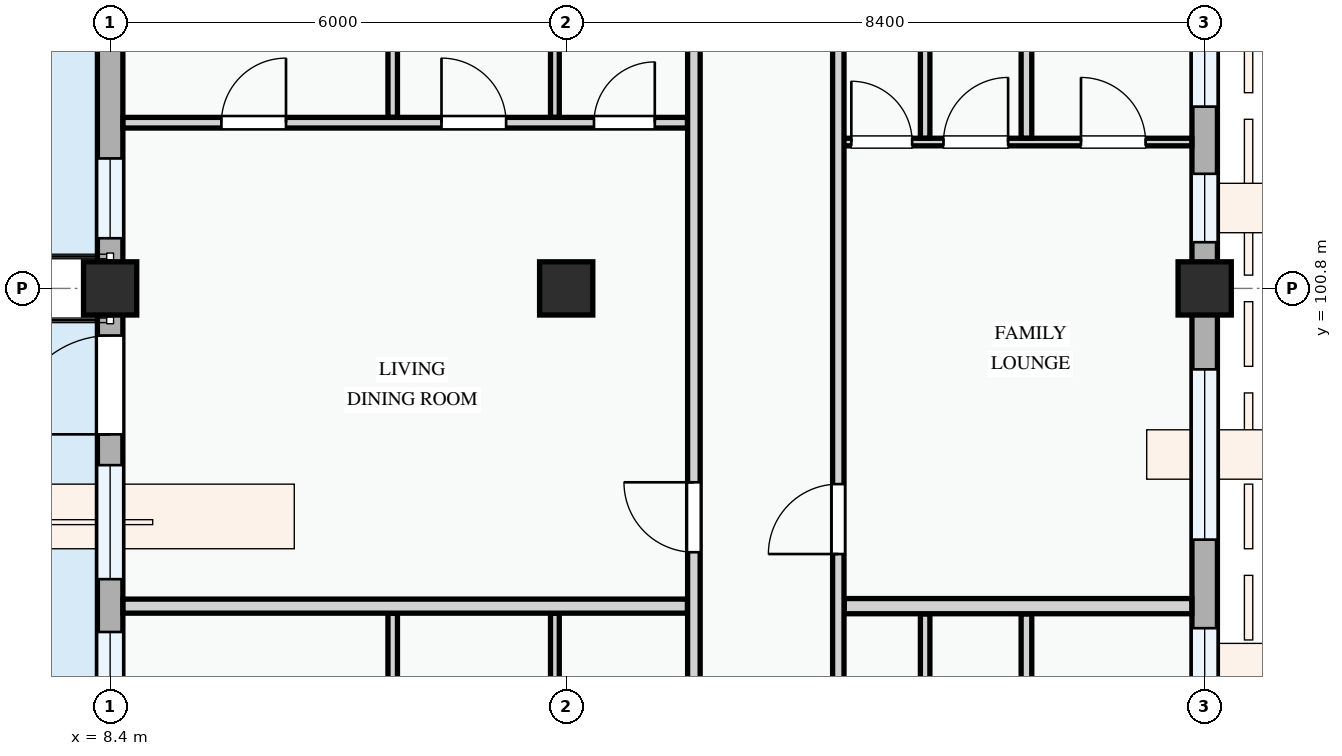
"""IFC4 building model, lengths in metres.
Left out: names, types, materials, properties, quantities, classifications, styles, units other than length and angle.
Written with IfcOpenShell. Run it as: python <this file> out.ifc"""

import sys

from ifc_helpers import new_model, si_unit, direction, frame, frame_2d, origin, origin_2d, place, context, subcontext, project, spatial, rectangle, extrude, element, fill, save


model = new_model("IFC4")
c1 = context("Model", 3, precision=1e-05, world=origin(), true_north=direction((0.0, 1.0)))
c2 = subcontext(c1, "Body", "Model", "MODEL_VIEW")
j1 = project(units=[si_unit("LENGTHUNIT", "METRE"), si_unit("PLANEANGLEUNIT", "RADIAN")], contexts=[c1])
p1 = place(None, origin())
s1 = spatial("IfcSite", under=j1, at=p1, CompositionType="ELEMENT")
p2 = place(p1, origin())
s2 = spatial("IfcBuilding", under=s1, at=p2, CompositionType="ELEMENT")
p3 = place(p2, frame((0.0, 0.0, 18.0)))
s3 = spatial("IfcBuildingStorey", under=s2, at=p3, CompositionType="ELEMENT", Elevation=18.0)
for number, where, z_axis, x_axis in (
    (1, (8.4, 100.8, 0.0), (0.0, 0.0, 1.0), (1.0, 0.0, 0.0)),
    (2, (14.4, 100.8, 0.0), (0.0, 0.0, 1.0), (1.0, 0.0, 0.0)),
    (3, (22.8, 100.8, 0.0), (0.0, 0.0, 1.0), (1.0, 0.0, 0.0)),
):
    element("IfcColumn", number, at=place(p3, frame(where, z_axis=z_axis, x_axis=x_axis)), inside=s3, PredefinedType="COLUMN", context=c2, shape_type="SweptSolid", body=[
        extrude(rectangle(XDim=0.7, YDim=0.7, at=origin_2d()), origin(), (0.0, 0.0, 1.0), 3.3),
    ])
p4 = place(p3, frame((8.4, 109.2, 0.0), z_axis=(0.0, 0.0, 1.0), x_axis=(0.0, -1.0, 0.0)))
e4 = element("IfcWall", 4, at=p4, inside=s3, PredefinedType="STANDARD", context=c2, shape_type="SweptSolid", body=[
    extrude(rectangle(XDim=8.4, YDim=0.335, at=frame_2d((4.2, 0.0))), origin(), (0.0, 0.0, 1.0), 2.425),
])
p5 = place(p4, frame((0.62, 0.0, 0.0)))
e5 = element("IfcOpeningElement", 5, at=p5, cuts=e4, PredefinedType="OPENING", context=c2, shape_type="SweptSolid", body=[
    extrude(rectangle(XDim=1.25, YDim=2.2, at=frame_2d((0.625, 1.1))), frame((0.0, 0.177, 0.0), z_axis=(0.0, -1.0, 0.0), x_axis=(1.0, 0.0, 0.0)), (0.0, 0.0, 1.0), 0.355),
])
p6 = place(p4, frame((3.16, 0.0, 0.78)))
e6 = element("IfcOpeningElement", 6, at=p6, cuts=e4, PredefinedType="OPENING", context=c2, shape_type="SweptSolid", body=[
    extrude(rectangle(XDim=1.82, YDim=1.46, at=frame_2d((0.91, 0.73))), frame((0.0, 0.177, 0.0), z_axis=(0.0, -1.0, 0.0), x_axis=(1.0, 0.0, 0.0)), (0.0, 0.0, 1.0), 0.355),
])
p7 = place(p4, frame((6.69, 0.0, 0.78)))
e7 = element("IfcOpeningElement", 7, at=p7, cuts=e4, PredefinedType="OPENING", context=c2, shape_type="SweptSolid", body=[
    extrude(rectangle(XDim=1.05, YDim=1.2, at=frame_2d((0.525, 0.6))), frame((0.0, 0.177, 0.0), z_axis=(0.0, -1.0, 0.0), x_axis=(1.0, 0.0, 0.0)), (0.0, 0.0, 1.0), 0.355),
])
p8 = place(p3, frame((8.4, 100.8, 0.0), z_axis=(0.0, 0.0, 1.0), x_axis=(0.0, -1.0, 0.0)))
e8 = element("IfcWall", 8, at=p8, inside=s3, PredefinedType="STANDARD", context=c2, shape_type="SweptSolid", body=[
    extrude(rectangle(XDim=6.0, YDim=0.335, at=frame_2d((3.0, 0.0))), origin(), (0.0, 0.0, 1.0), 2.575),
])
p9 = place(p8, frame((0.62, 0.0, 0.0)))
e9 = element("IfcOpeningElement", 9, at=p9, cuts=e8, PredefinedType="OPENING", context=c2, shape_type="SweptSolid", body=[
    extrude(rectangle(XDim=1.3, YDim=2.15, at=frame_2d((0.65, 1.075))), frame((0.0, 0.177, 0.0), z_axis=(0.0, -1.0, 0.0), x_axis=(1.0, 0.0, 0.0)), (0.0, 0.0, 1.0), 0.355),
])
p10 = place(p8, frame((2.325, 0.0, 0.78)))
e10 = element("IfcOpeningElement", 10, at=p10, cuts=e8, PredefinedType="OPENING", context=c2, shape_type="SweptSolid", body=[
    extrude(rectangle(XDim=1.5, YDim=1.5, at=frame_2d((0.75, 0.75))), frame((0.0, 0.177, 0.0), z_axis=(0.0, -1.0, 0.0), x_axis=(1.0, 0.0, 0.0)), (0.0, 0.0, 1.0), 0.355),
])
p11 = place(p8, frame((4.52, 0.0, 0.78)))
e11 = element("IfcOpeningElement", 11, at=p11, cuts=e8, PredefinedType="OPENING", context=c2, shape_type="SweptSolid", body=[
    extrude(rectangle(XDim=0.95, YDim=1.15, at=frame_2d((0.475, 0.575))), frame((0.0, 0.177, 0.0), z_axis=(0.0, -1.0, 0.0), x_axis=(1.0, 0.0, 0.0)), (0.0, 0.0, 1.0), 0.355),
])
p12 = place(p3, frame((22.8, 94.8, 0.0), z_axis=(0.0, 0.0, 1.0), x_axis=(0.0, 1.0, 0.0)))
e12 = element("IfcWall", 12, at=p12, inside=s3, PredefinedType="STANDARD", context=c2, shape_type="SweptSolid", body=[
    extrude(rectangle(XDim=6.0, YDim=0.335, at=frame_2d((3.0, 0.0))), origin(), (0.0, 0.0, 1.0), 2.575),
])
p13 = place(p12, frame((0.48, 0.0, 0.78)))
e13 = element("IfcOpeningElement", 13, at=p13, cuts=e12, PredefinedType="OPENING", context=c2, shape_type="SweptSolid", body=[
    extrude(rectangle(XDim=1.05, YDim=1.2, at=frame_2d((0.525, 0.6))), frame((0.0, 0.177, 0.0), z_axis=(0.0, -1.0, 0.0), x_axis=(1.0, 0.0, 0.0)), (0.0, 0.0, 1.0), 0.355),
])
p14 = place(p12, frame((2.695, 0.0, 0.78)))
e14 = element("IfcOpeningElement", 14, at=p14, cuts=e12, PredefinedType="OPENING", context=c2, shape_type="SweptSolid", body=[
    extrude(rectangle(XDim=2.24, YDim=1.52, at=frame_2d((1.12, 0.76))), frame((0.0, 0.177, 0.0), z_axis=(0.0, -1.0, 0.0), x_axis=(1.0, 0.0, 0.0)), (0.0, 0.0, 1.0), 0.355),
])
p15 = place(p3, frame((22.8, 100.8, 0.0), z_axis=(0.0, 0.0, 1.0), x_axis=(0.0, 1.0, 0.0)))
e15 = element("IfcWall", 15, at=p15, inside=s3, PredefinedType="STANDARD", context=c2, shape_type="SweptSolid", body=[
    extrude(rectangle(XDim=8.4, YDim=0.335, at=frame_2d((4.2, 0.0))), origin(), (0.0, 0.0, 1.0), 2.425),
])
p16 = place(p15, frame((0.608, 0.0, 0.78)))
e16 = element("IfcOpeningElement", 16, at=p16, cuts=e15, PredefinedType="OPENING", context=c2, shape_type="SweptSolid", body=[
    extrude(rectangle(XDim=0.9, YDim=1.2, at=frame_2d((0.45, 0.6))), frame((0.0, 0.177, 0.0), z_axis=(0.0, -1.0, 0.0), x_axis=(1.0, 0.0, 0.0)), (0.0, 0.0, 1.0), 0.355),
])
p17 = place(p15, frame((2.392, 0.0, 0.78)))
e17 = element("IfcOpeningElement", 17, at=p17, cuts=e15, PredefinedType="OPENING", context=c2, shape_type="SweptSolid", body=[
    extrude(rectangle(XDim=2.28, YDim=1.46, at=frame_2d((1.14, 0.73))), frame((0.0, 0.177, 0.0), z_axis=(0.0, -1.0, 0.0), x_axis=(1.0, 0.0, 0.0)), (0.0, 0.0, 1.0), 0.355),
])
p18 = place(p15, frame((6.154, 0.0, 0.78)))
e18 = element("IfcOpeningElement", 18, at=p18, cuts=e15, PredefinedType="OPENING", context=c2, shape_type="SweptSolid", body=[
    extrude(rectangle(XDim=0.9, YDim=1.2, at=frame_2d((0.45, 0.6))), frame((0.0, 0.177, 0.0), z_axis=(0.0, -1.0, 0.0), x_axis=(1.0, 0.0, 0.0)), (0.0, 0.0, 1.0), 0.355),
])
p19 = place(p3, frame((12.118, 90.002, 0.0), z_axis=(0.0, 0.0, 1.0), x_axis=(0.0, 1.0, 0.0)))
e19 = element("IfcWall", 19, at=p19, inside=s3, PredefinedType="PARTITIONING", context=c2, shape_type="SweptSolid", body=[
    extrude(rectangle(XDim=6.523, YDim=0.125, at=frame_2d((3.262, 0.0))), origin(), (0.0, 0.0, 1.0), 3.0),
])
p20 = place(p3, frame((14.251, 90.002, 0.0), z_axis=(0.0, 0.0, 1.0), x_axis=(0.0, 1.0, 0.0)))
e20 = element("IfcWall", 20, at=p20, inside=s3, PredefinedType="PARTITIONING", context=c2, shape_type="SweptSolid", body=[
    extrude(rectangle(XDim=6.523, YDim=0.115, at=frame_2d((3.262, 0.0))), origin(), (0.0, 0.0, 1.0), 2.425),
])
p21 = place(p3, frame((20.455, 89.714, 0.0), z_axis=(0.0, 0.0, 1.0), x_axis=(0.0, 1.0, 0.0)))
e21 = element("IfcWall", 21, at=p21, inside=s3, PredefinedType="PARTITIONING", context=c2, shape_type="SweptSolid", body=[
    extrude(rectangle(XDim=6.804, YDim=0.14, at=frame_2d((3.402, 0.0))), origin(), (0.0, 0.0, 1.0), 3.0),
])
p22 = place(p3, frame((19.122, 89.714, 0.0), z_axis=(0.0, 0.0, 1.0), x_axis=(0.0, 1.0, 0.0)))
e22 = element("IfcWall", 22, at=p22, inside=s3, PredefinedType="PARTITIONING", context=c2, shape_type="SweptSolid", body=[
    extrude(rectangle(XDim=6.804, YDim=0.125, at=frame_2d((3.402, 0.0))), origin(), (0.0, 0.0, 1.0), 3.0),
])
p23 = place(p3, frame((8.57, 102.98, 0.0), z_axis=(0.0, 0.0, 1.0), x_axis=(1.0, 0.0, 0.0)))
e23 = element("IfcWall", 23, at=p23, inside=s3, PredefinedType="PARTITIONING", context=c2, shape_type="SweptSolid", body=[
    extrude(rectangle(XDim=7.426, YDim=0.14, at=frame_2d((3.713, 0.0))), origin(), (0.0, 0.0, 1.0), 3.0),
])
p24 = place(p23, frame((1.294, 0.0, 0.0)))
e24 = element("IfcOpeningElement", 24, at=p24, cuts=e23, PredefinedType="OPENING", context=c2, shape_type="SweptSolid", body=[
    extrude(rectangle(XDim=0.85, YDim=2.1, at=frame_2d((0.425, 1.05))), frame((0.0, 0.08, 0.0), z_axis=(0.0, -1.0, 0.0), x_axis=(1.0, 0.0, 0.0)), (0.0, 0.0, 1.0), 0.16),
])
p25 = place(p23, frame((4.19, 0.0, 0.0)))
e25 = element("IfcOpeningElement", 25, at=p25, cuts=e23, PredefinedType="OPENING", context=c2, shape_type="SweptSolid", body=[
    extrude(rectangle(XDim=0.85, YDim=2.1, at=frame_2d((0.425, 1.05))), frame((0.0, 0.08, 0.0), z_axis=(0.0, -1.0, 0.0), x_axis=(1.0, 0.0, 0.0)), (0.0, 0.0, 1.0), 0.16),
])
p26 = place(p23, frame((6.196, 0.0, 0.0)))
e26 = element("IfcOpeningElement", 26, at=p26, cuts=e23, PredefinedType="OPENING", context=c2, shape_type="SweptSolid", body=[
    extrude(rectangle(XDim=0.8, YDim=2.1, at=frame_2d((0.4, 1.05))), frame((0.0, 0.08, 0.0), z_axis=(0.0, -1.0, 0.0), x_axis=(1.0, 0.0, 0.0)), (0.0, 0.0, 1.0), 0.16),
])
p27 = place(p3, frame((12.118, 103.052, 0.0), z_axis=(0.0, 0.0, 1.0), x_axis=(0.0, 1.0, 0.0)))
e27 = element("IfcWall", 27, at=p27, inside=s3, PredefinedType="PARTITIONING", context=c2, shape_type="SweptSolid", body=[
    extrude(rectangle(XDim=6.176, YDim=0.125, at=frame_2d((3.088, 0.0))), origin(), (0.0, 0.0, 1.0), 3.0),
])
p28 = place(p3, frame((14.251, 103.052, 0.0), z_axis=(0.0, 0.0, 1.0), x_axis=(0.0, 1.0, 0.0)))
e28 = element("IfcWall", 28, at=p28, inside=s3, PredefinedType="PARTITIONING", context=c2, shape_type="SweptSolid", body=[
    extrude(rectangle(XDim=6.176, YDim=0.115, at=frame_2d((3.088, 0.0))), origin(), (0.0, 0.0, 1.0), 2.425),
])
p29 = place(p3, frame((17.98, 102.726, 0.0), z_axis=(0.0, 0.0, 1.0), x_axis=(1.0, 0.0, 0.0)))
e29 = element("IfcWall", 29, at=p29, inside=s3, PredefinedType="PARTITIONING", context=c2, shape_type="SweptSolid", body=[
    extrude(rectangle(XDim=4.651, YDim=0.1, at=frame_2d((2.325, 0.0))), origin(), (0.0, 0.0, 1.0), 3.0),
])
p30 = place(p29, frame((0.171, 0.0, 0.0)))
e30 = element("IfcOpeningElement", 30, at=p30, cuts=e29, PredefinedType="OPENING", context=c2, shape_type="SweptSolid", body=[
    extrude(rectangle(XDim=0.8, YDim=2.1, at=frame_2d((0.4, 1.05))), frame((0.0, 0.06, 0.0), z_axis=(0.0, -1.0, 0.0), x_axis=(1.0, 0.0, 0.0)), (0.0, 0.0, 1.0), 0.12),
])
p31 = place(p29, frame((1.384, 0.0, 0.0)))
e31 = element("IfcOpeningElement", 31, at=p31, cuts=e29, PredefinedType="OPENING", context=c2, shape_type="SweptSolid", body=[
    extrude(rectangle(XDim=0.85, YDim=2.1, at=frame_2d((0.425, 1.05))), frame((0.0, 0.06, 0.0), z_axis=(0.0, -1.0, 0.0), x_axis=(1.0, 0.0, 0.0)), (0.0, 0.0, 1.0), 0.12),
])
p32 = place(p29, frame((3.193, 0.0, 0.0)))
e32 = element("IfcOpeningElement", 32, at=p32, cuts=e29, PredefinedType="OPENING", context=c2, shape_type="SweptSolid", body=[
    extrude(rectangle(XDim=0.85, YDim=2.1, at=frame_2d((0.425, 1.05))), frame((0.0, 0.06, 0.0), z_axis=(0.0, -1.0, 0.0), x_axis=(1.0, 0.0, 0.0)), (0.0, 0.0, 1.0), 0.12),
])
p33 = place(p3, frame((20.455, 102.778, 0.0), z_axis=(0.0, 0.0, 1.0), x_axis=(0.0, 1.0, 0.0)))
e33 = element("IfcWall", 33, at=p33, inside=s3, PredefinedType="PARTITIONING", context=c2, shape_type="SweptSolid", body=[
    extrude(rectangle(XDim=6.468, YDim=0.14, at=frame_2d((3.234, 0.0))), origin(), (0.0, 0.0, 1.0), 3.0),
])
p34 = place(p3, frame((19.122, 102.778, 0.0), z_axis=(0.0, 0.0, 1.0), x_axis=(0.0, 1.0, 0.0)))
e34 = element("IfcWall", 34, at=p34, inside=s3, PredefinedType="PARTITIONING", context=c2, shape_type="SweptSolid", body=[
    extrude(rectangle(XDim=6.468, YDim=0.125, at=frame_2d((3.234, 0.0))), origin(), (0.0, 0.0, 1.0), 3.0),
])
p35 = place(p3, frame((8.57, 96.62, 0.0), z_axis=(0.0, 0.0, 1.0), x_axis=(1.0, 0.0, 0.0)))
e35 = element("IfcWall", 35, at=p35, inside=s3, PredefinedType="PARTITIONING", context=c2, shape_type="SweptSolid", body=[
    extrude(rectangle(XDim=7.426, YDim=0.185, at=frame_2d((3.713, 0.0))), origin(), (0.0, 0.0, 1.0), 3.0),
])
p36 = place(p3, frame((18.057, 96.62, 0.0), z_axis=(0.0, 0.0, 1.0), x_axis=(1.0, 0.0, 0.0)))
e36 = element("IfcWall", 36, at=p36, inside=s3, PredefinedType="PARTITIONING", context=c2, shape_type="SweptSolid", body=[
    extrude(rectangle(XDim=4.574, YDim=0.2, at=frame_2d((2.287, 0.0))), origin(), (0.0, 0.0, 1.0), 3.0),
])
p37 = place(p3, frame((16.08, 72.06, 0.0), z_axis=(0.0, 0.0, 1.0), x_axis=(0.0, 1.0, 0.0)))
e37 = element("IfcWall", 37, at=p37, inside=s3, PredefinedType="PARTITIONING", context=c2, shape_type="SweptSolid", body=[
    extrude(rectangle(XDim=37.28, YDim=0.165, at=frame_2d((18.64, 0.0))), origin(), (0.0, 0.0, 1.0), 3.0),
])
p38 = place(p37, frame((3.606, 0.0, 0.0)))
e38 = element("IfcOpeningElement", 38, at=p38, cuts=e37, PredefinedType="OPENING", context=c2, shape_type="SweptSolid", body=[
    extrude(rectangle(XDim=0.92, YDim=2.1, at=frame_2d((0.46, 1.05))), frame((0.0, 0.093, 0.0), z_axis=(0.0, -1.0, 0.0), x_axis=(1.0, 0.0, 0.0)), (0.0, 0.0, 1.0), 0.185),
])
p39 = place(p37, frame((16.66, 0.0, 0.0)))
e39 = element("IfcOpeningElement", 39, at=p39, cuts=e37, PredefinedType="OPENING", context=c2, shape_type="SweptSolid", body=[
    extrude(rectangle(XDim=0.96, YDim=2.12, at=frame_2d((0.48, 1.06))), frame((0.0, 0.093, 0.0), z_axis=(0.0, -1.0, 0.0), x_axis=(1.0, 0.0, 0.0)), (0.0, 0.0, 1.0), 0.185),
])
p40 = place(p37, frame((25.269, 0.0, 0.0)))
e40 = element("IfcOpeningElement", 40, at=p40, cuts=e37, PredefinedType="OPENING", context=c2, shape_type="SweptSolid", body=[
    extrude(rectangle(XDim=0.92, YDim=2.1, at=frame_2d((0.46, 1.05))), frame((0.0, 0.093, 0.0), z_axis=(0.0, -1.0, 0.0), x_axis=(1.0, 0.0, 0.0)), (0.0, 0.0, 1.0), 0.185),
])
p41 = place(p3, frame((17.98, 72.06, 0.0), z_axis=(0.0, 0.0, 1.0), x_axis=(0.0, 1.0, 0.0)))
e41 = element("IfcWall", 41, at=p41, inside=s3, PredefinedType="PARTITIONING", context=c2, shape_type="SweptSolid", body=[
    extrude(rectangle(XDim=37.28, YDim=0.15, at=frame_2d((18.64, 0.0))), origin(), (0.0, 0.0, 1.0), 3.0),
])
p42 = place(p41, frame((3.668, 0.0, 0.0)))
e42 = element("IfcOpeningElement", 42, at=p42, cuts=e41, PredefinedType="OPENING", context=c2, shape_type="SweptSolid", body=[
    extrude(rectangle(XDim=0.92, YDim=2.1, at=frame_2d((0.46, 1.05))), frame((0.0, 0.085, 0.0), z_axis=(0.0, -1.0, 0.0), x_axis=(1.0, 0.0, 0.0)), (0.0, 0.0, 1.0), 0.17),
])
p43 = place(p41, frame((16.392, 0.0, 0.0)))
e43 = element("IfcOpeningElement", 43, at=p43, cuts=e41, PredefinedType="OPENING", context=c2, shape_type="SweptSolid", body=[
    extrude(rectangle(XDim=0.92, YDim=2.1, at=frame_2d((0.46, 1.05))), frame((0.0, 0.085, 0.0), z_axis=(0.0, -1.0, 0.0), x_axis=(1.0, 0.0, 0.0)), (0.0, 0.0, 1.0), 0.17),
])
p44 = place(p41, frame((25.246, 0.0, 0.0)))
e44 = element("IfcOpeningElement", 44, at=p44, cuts=e41, PredefinedType="OPENING", context=c2, shape_type="SweptSolid", body=[
    extrude(rectangle(XDim=0.92, YDim=2.1, at=frame_2d((0.46, 1.05))), frame((0.0, 0.085, 0.0), z_axis=(0.0, -1.0, 0.0), x_axis=(1.0, 0.0, 0.0)), (0.0, 0.0, 1.0), 0.17),
])
p45 = place(p7, origin())
e45 = element("IfcWindow", 45, at=p45, inside=s3, PartitioningType="SINGLE_PANEL", PredefinedType="WINDOW", context=c2, shape_type="SweptSolid", body=[
    extrude(rectangle(XDim=1.05, YDim=1.2, at=frame_2d((0.525, 0.6))), frame((0.0, 0.03, 0.0), z_axis=(0.0, -1.0, 0.0), x_axis=(1.0, 0.0, 0.0)), (0.0, 0.0, 1.0), 0.06),
])
fill(e7, e45)
p46 = place(p9, frame((1.3, 0.0, 0.0), z_axis=(0.0, 0.0, 1.0), x_axis=(-1.0, 0.0, 0.0)))
e46 = element("IfcDoor", 46, at=p46, inside=s3, OperationType="SINGLE_SWING_LEFT", PredefinedType="DOOR", context=c2, shape_type="SweptSolid", body=[
    extrude(rectangle(XDim=1.3, YDim=2.15, at=frame_2d((0.65, 1.075))), frame((0.0, 0.025, 0.0), z_axis=(0.0, -1.0, 0.0), x_axis=(1.0, 0.0, 0.0)), (0.0, 0.0, 1.0), 0.05),
])
fill(e9, e46)
p47 = place(p10, origin())
e47 = element("IfcWindow", 47, at=p47, inside=s3, PartitioningType="SINGLE_PANEL", PredefinedType="WINDOW", context=c2, shape_type="SweptSolid", body=[
    extrude(rectangle(XDim=1.5, YDim=1.5, at=frame_2d((0.75, 0.75))), frame((0.0, 0.03, 0.0), z_axis=(0.0, -1.0, 0.0), x_axis=(1.0, 0.0, 0.0)), (0.0, 0.0, 1.0), 0.06),
])
fill(e10, e47)
p48 = place(p11, origin())
e48 = element("IfcWindow", 48, at=p48, inside=s3, PartitioningType="SINGLE_PANEL", PredefinedType="WINDOW", context=c2, shape_type="SweptSolid", body=[
    extrude(rectangle(XDim=0.95, YDim=1.15, at=frame_2d((0.475, 0.575))), frame((0.0, 0.03, 0.0), z_axis=(0.0, -1.0, 0.0), x_axis=(1.0, 0.0, 0.0)), (0.0, 0.0, 1.0), 0.06),
])
fill(e11, e48)
p49 = place(p13, origin())
e49 = element("IfcWindow", 49, at=p49, inside=s3, PartitioningType="SINGLE_PANEL", PredefinedType="WINDOW", context=c2, shape_type="SweptSolid", body=[
    extrude(rectangle(XDim=1.05, YDim=1.2, at=frame_2d((0.525, 0.6))), frame((0.0, 0.03, 0.0), z_axis=(0.0, -1.0, 0.0), x_axis=(1.0, 0.0, 0.0)), (0.0, 0.0, 1.0), 0.06),
])
fill(e13, e49)
p50 = place(p14, origin())
e50 = element("IfcWindow", 50, at=p50, inside=s3, PartitioningType="DOUBLE_PANEL_VERTICAL", PredefinedType="WINDOW", context=c2, shape_type="SweptSolid", body=[
    extrude(rectangle(XDim=2.24, YDim=1.52, at=frame_2d((1.12, 0.76))), frame((0.0, 0.03, 0.0), z_axis=(0.0, -1.0, 0.0), x_axis=(1.0, 0.0, 0.0)), (0.0, 0.0, 1.0), 0.06),
])
fill(e14, e50)
p51 = place(p16, origin())
e51 = element("IfcWindow", 51, at=p51, inside=s3, PartitioningType="SINGLE_PANEL", PredefinedType="WINDOW", context=c2, shape_type="SweptSolid", body=[
    extrude(rectangle(XDim=0.9, YDim=1.2, at=frame_2d((0.45, 0.6))), frame((0.0, 0.03, 0.0), z_axis=(0.0, -1.0, 0.0), x_axis=(1.0, 0.0, 0.0)), (0.0, 0.0, 1.0), 0.06),
])
fill(e16, e51)
p52 = place(p17, origin())
e52 = element("IfcWindow", 52, at=p52, inside=s3, PartitioningType="DOUBLE_PANEL_VERTICAL", PredefinedType="WINDOW", context=c2, shape_type="SweptSolid", body=[
    extrude(rectangle(XDim=2.28, YDim=1.46, at=frame_2d((1.14, 0.73))), frame((0.0, 0.03, 0.0), z_axis=(0.0, -1.0, 0.0), x_axis=(1.0, 0.0, 0.0)), (0.0, 0.0, 1.0), 0.06),
])
fill(e17, e52)
p53 = place(p24, origin())
e53 = element("IfcDoor", 53, at=p53, inside=s3, OperationType="SINGLE_SWING_RIGHT", PredefinedType="DOOR", context=c2, shape_type="SweptSolid", body=[
    extrude(rectangle(XDim=0.85, YDim=2.1, at=frame_2d((0.425, 1.05))), frame((0.0, 0.025, 0.0), z_axis=(0.0, -1.0, 0.0), x_axis=(1.0, 0.0, 0.0)), (0.0, 0.0, 1.0), 0.05),
])
fill(e24, e53)
p54 = place(p25, origin())
e54 = element("IfcDoor", 54, at=p54, inside=s3, OperationType="SINGLE_SWING_LEFT", PredefinedType="DOOR", context=c2, shape_type="SweptSolid", body=[
    extrude(rectangle(XDim=0.85, YDim=2.1, at=frame_2d((0.425, 1.05))), frame((0.0, 0.025, 0.0), z_axis=(0.0, -1.0, 0.0), x_axis=(1.0, 0.0, 0.0)), (0.0, 0.0, 1.0), 0.05),
])
fill(e25, e54)
p55 = place(p26, origin())
e55 = element("IfcDoor", 55, at=p55, inside=s3, OperationType="SINGLE_SWING_RIGHT", PredefinedType="DOOR", context=c2, shape_type="SweptSolid", body=[
    extrude(rectangle(XDim=0.8, YDim=2.1, at=frame_2d((0.4, 1.05))), frame((0.0, 0.025, 0.0), z_axis=(0.0, -1.0, 0.0), x_axis=(1.0, 0.0, 0.0)), (0.0, 0.0, 1.0), 0.05),
])
fill(e26, e55)
p56 = place(p30, origin())
e56 = element("IfcDoor", 56, at=p56, inside=s3, OperationType="SINGLE_SWING_LEFT", PredefinedType="DOOR", context=c2, shape_type="SweptSolid", body=[
    extrude(rectangle(XDim=0.8, YDim=2.1, at=frame_2d((0.4, 1.05))), frame((0.0, 0.025, 0.0), z_axis=(0.0, -1.0, 0.0), x_axis=(1.0, 0.0, 0.0)), (0.0, 0.0, 1.0), 0.05),
])
fill(e30, e56)
p57 = place(p31, origin())
e57 = element("IfcDoor", 57, at=p57, inside=s3, OperationType="SINGLE_SWING_RIGHT", PredefinedType="DOOR", context=c2, shape_type="SweptSolid", body=[
    extrude(rectangle(XDim=0.85, YDim=2.1, at=frame_2d((0.425, 1.05))), frame((0.0, 0.025, 0.0), z_axis=(0.0, -1.0, 0.0), x_axis=(1.0, 0.0, 0.0)), (0.0, 0.0, 1.0), 0.05),
])
fill(e31, e57)
p58 = place(p32, origin())
e58 = element("IfcDoor", 58, at=p58, inside=s3, OperationType="SINGLE_SWING_LEFT", PredefinedType="DOOR", context=c2, shape_type="SweptSolid", body=[
    extrude(rectangle(XDim=0.85, YDim=2.1, at=frame_2d((0.425, 1.05))), frame((0.0, 0.025, 0.0), z_axis=(0.0, -1.0, 0.0), x_axis=(1.0, 0.0, 0.0)), (0.0, 0.0, 1.0), 0.05),
])
fill(e32, e58)
p59 = place(p40, origin())
e59 = element("IfcDoor", 59, at=p59, inside=s3, OperationType="SINGLE_SWING_RIGHT", PredefinedType="DOOR", context=c2, shape_type="SweptSolid", body=[
    extrude(rectangle(XDim=0.92, YDim=2.1, at=frame_2d((0.46, 1.05))), frame((0.0, 0.025, 0.0), z_axis=(0.0, -1.0, 0.0), x_axis=(1.0, 0.0, 0.0)), (0.0, 0.0, 1.0), 0.05),
])
fill(e40, e59)
p60 = place(p44, origin())
e60 = element("IfcDoor", 60, at=p60, inside=s3, OperationType="SINGLE_SWING_LEFT", PredefinedType="DOOR", context=c2, shape_type="SweptSolid", body=[
    extrude(rectangle(XDim=0.92, YDim=2.1, at=frame_2d((0.46, 1.05))), frame((0.0, 0.025, 0.0), z_axis=(0.0, -1.0, 0.0), x_axis=(1.0, 0.0, 0.0)), (0.0, 0.0, 1.0), 0.05),
])
fill(e44, e60)
save(model, sys.argv[1])
